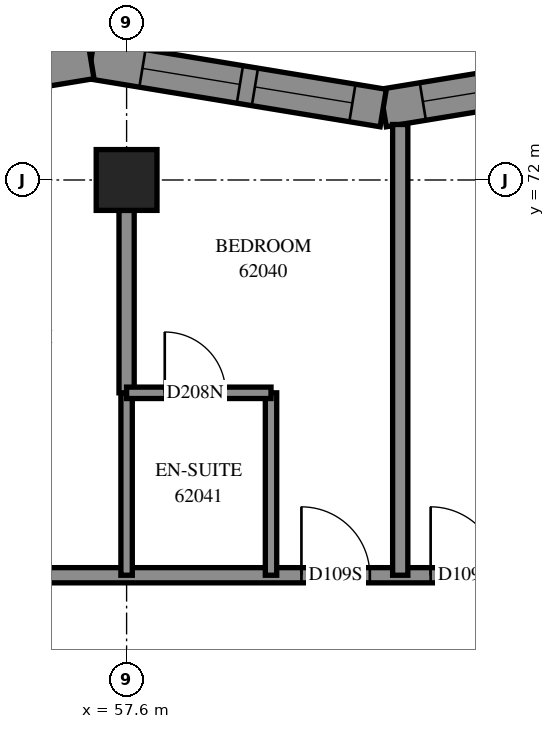
"""IFC4 building model, lengths in metres.
Left out: names, types, materials, properties, quantities, classifications, styles, units other than length and angle.
Written with IfcOpenShell. Run it as: python <this file> out.ifc"""

import sys

from ifc_helpers import new_model, si_unit, direction, frame, frame_2d, origin, origin_2d, place, context, subcontext, project, spatial, polyline, rectangle, outline, extrude, element, fill, save


model = new_model("IFC4")
c1 = context("Model", 3, precision=1e-05, world=origin(), true_north=direction((0.0, 1.0)))
c2 = subcontext(c1, "Body", "Model", "MODEL_VIEW")
j1 = project(units=[si_unit("LENGTHUNIT", "METRE"), si_unit("PLANEANGLEUNIT", "RADIAN")], contexts=[c1])
p1 = place(None, origin())
s1 = spatial("IfcSite", under=j1, at=p1, CompositionType="ELEMENT")
p2 = place(p1, origin())
s2 = spatial("IfcBuilding", under=s1, at=p2, CompositionType="ELEMENT")
p3 = place(p2, frame((0.0, 0.0, 227.0)))
s3 = spatial("IfcBuildingStorey", under=s2, at=p3, CompositionType="ELEMENT", Elevation=227.0)
p4 = place(p3, frame((57.6, 72.0, 0.0), z_axis=(0.0, 0.0, 1.0), x_axis=(1.0, 0.0, 0.0)))
e1 = element("IfcColumn", 1, at=p4, inside=s3, PredefinedType="COLUMN", context=c2, shape_type="SweptSolid", body=[
    extrude(rectangle(XDim=0.8, YDim=0.8, at=origin_2d()), origin(), (0.0, 0.0, 1.0), 3.1),
])
p5 = place(p3, frame((64.822, 73.58, 0.0), z_axis=(0.0, 0.0, 1.0), x_axis=(-0.9867213513, -0.1624222118, 0.0)))
e2 = element("IfcWall", 2, at=p5, inside=s3, PredefinedType="SOLIDWALL", context=c2, shape_type="SweptSolid", body=[
    extrude(outline(polyline([(-0.041, -0.25), (3.856, -0.25), (3.938, 0.25), (0.041, 0.25), (-0.041, -0.25)])), origin(), (0.0, 0.0, 1.0), 3.1),
])
p6 = place(p5, frame((0.569, 0.0, 0.45)))
e3 = element("IfcOpeningElement", 3, at=p6, cuts=e2, PredefinedType="OPENING", context=c2, shape_type="SweptSolid", body=[
    extrude(rectangle(XDim=1.3, YDim=2.5, at=frame_2d((0.65, 1.25))), frame((0.0, 0.26, 0.0), z_axis=(0.0, -1.0, 0.0), x_axis=(1.0, 0.0, 0.0)), (0.0, 0.0, 1.0), 0.52),
])
p7 = place(p5, frame((2.069, 0.0, 0.45)))
e4 = element("IfcOpeningElement", 4, at=p7, cuts=e2, PredefinedType="OPENING", context=c2, shape_type="SweptSolid", body=[
    extrude(rectangle(XDim=1.3, YDim=2.5, at=frame_2d((0.65, 1.25))), frame((0.0, 0.26, 0.0), z_axis=(0.0, -1.0, 0.0), x_axis=(1.0, 0.0, 0.0)), (0.0, 0.0, 1.0), 0.52),
])
p8 = place(p3, frame((60.976, 72.947, 0.0), z_axis=(0.0, 0.0, 1.0), x_axis=(-0.9867206744, 0.1624263241, 0.0)))
e5 = element("IfcWall", 5, at=p8, inside=s3, PredefinedType="SOLIDWALL", context=c2, shape_type="SweptSolid", body=[
    extrude(outline(polyline([(0.041, -0.25), (3.938, -0.25), (3.856, 0.25), (-0.041, 0.25), (0.041, -0.25)])), origin(), (0.0, 0.0, 1.0), 3.1),
])
p9 = place(p8, frame((0.411, 0.0, 0.45)))
e6 = element("IfcOpeningElement", 6, at=p9, cuts=e5, PredefinedType="OPENING", context=c2, shape_type="SweptSolid", body=[
    extrude(rectangle(XDim=1.3, YDim=2.5, at=frame_2d((0.65, 1.25))), frame((0.0, 0.26, 0.0), z_axis=(0.0, -1.0, 0.0), x_axis=(1.0, 0.0, 0.0)), (0.0, 0.0, 1.0), 0.52),
])
p10 = place(p8, frame((1.911, 0.0, 0.45)))
e7 = element("IfcOpeningElement", 7, at=p10, cuts=e5, PredefinedType="OPENING", context=c2, shape_type="SweptSolid", body=[
    extrude(rectangle(XDim=1.3, YDim=2.5, at=frame_2d((0.65, 1.25))), frame((0.0, 0.26, 0.0), z_axis=(0.0, -1.0, 0.0), x_axis=(1.0, 0.0, 0.0)), (0.0, 0.0, 1.0), 0.52),
])
p11 = place(p3, frame((57.131, 73.58, 0.0), z_axis=(0.0, 0.0, 1.0), x_axis=(-0.9867213513, -0.1624222118, 0.0)))
e8 = element("IfcWall", 8, at=p11, inside=s3, PredefinedType="SOLIDWALL", context=c2, shape_type="SweptSolid", body=[
    extrude(outline(polyline([(-0.041, -0.25), (3.856, -0.25), (3.938, 0.25), (0.041, 0.25), (-0.041, -0.25)])), origin(), (0.0, 0.0, 1.0), 3.1),
])
p12 = place(p11, frame((1.107, 0.0, 0.45)))
e9 = element("IfcOpeningElement", 9, at=p12, cuts=e8, PredefinedType="OPENING", context=c2, shape_type="SweptSolid", body=[
    extrude(rectangle(XDim=1.2, YDim=2.5, at=frame_2d((0.6, 1.25))), frame((0.0, 0.26, 0.0), z_axis=(0.0, -1.0, 0.0), x_axis=(1.0, 0.0, 0.0)), (0.0, 0.0, 1.0), 0.52),
])
p13 = place(p3, frame((55.6, 66.8, 0.0), z_axis=(0.0, 0.0, 1.0), x_axis=(1.0, 0.0, 0.0)))
e10 = element("IfcWall", 10, at=p13, inside=s3, PredefinedType="PARTITIONING", context=c2, shape_type="SweptSolid", body=[
    extrude(rectangle(XDim=18.4, YDim=0.2, at=frame_2d((9.2, 0.0))), origin(), (0.0, 0.0, 1.0), 3.1),
])
p14 = place(p13, frame((4.3, 0.0, 0.0)))
e11 = element("IfcOpeningElement", 11, at=p14, cuts=e10, PredefinedType="OPENING", context=c2, shape_type="SweptSolid", body=[
    extrude(rectangle(XDim=0.9, YDim=2.1, at=frame_2d((0.45, 1.05))), frame((0.0, 0.11, 0.0), z_axis=(0.0, -1.0, 0.0), x_axis=(1.0, 0.0, 0.0)), (0.0, 0.0, 1.0), 0.22),
])
p15 = place(p13, frame((6.0, 0.0, 0.0)))
e12 = element("IfcOpeningElement", 12, at=p15, cuts=e10, PredefinedType="OPENING", context=c2, shape_type="SweptSolid", body=[
    extrude(rectangle(XDim=0.9, YDim=2.1, at=frame_2d((0.45, 1.05))), frame((0.0, 0.11, 0.0), z_axis=(0.0, -1.0, 0.0), x_axis=(1.0, 0.0, 0.0)), (0.0, 0.0, 1.0), 0.22),
])
p16 = place(p13, frame((13.367, 0.0, 0.0)))
e13 = element("IfcOpeningElement", 13, at=p16, cuts=e10, PredefinedType="OPENING", context=c2, shape_type="SweptSolid", body=[
    extrude(rectangle(XDim=1.0, YDim=2.1, at=frame_2d((0.5, 1.05))), frame((0.0, 0.11, 0.0), z_axis=(0.0, -1.0, 0.0), x_axis=(1.0, 0.0, 0.0)), (0.0, 0.0, 1.0), 0.22),
])
p17 = place(p3, frame((61.2, 66.8, 0.0), z_axis=(0.0, 0.0, 1.0), x_axis=(0.0, 1.0, 0.0)))
e14 = element("IfcWall", 14, at=p17, inside=s3, PredefinedType="PARTITIONING", context=c2, shape_type="SweptSolid", body=[
    extrude(rectangle(XDim=5.93, YDim=0.2, at=frame_2d((2.965, 0.0))), origin(), (0.0, 0.0, 1.0), 3.1),
])
for number, where, z_axis, x_axis in (
    (15, (57.6, 66.8, 0.0), (0.0, 0.0, 1.0), (0.0, 1.0, 0.0)),
    (16, (59.5, 66.8, 0.0), (0.0, 0.0, 1.0), (0.0, 1.0, 0.0)),
):
    element("IfcWall", number, at=place(p3, frame(where, z_axis=z_axis, x_axis=x_axis)), inside=s3, PredefinedType="PARTITIONING", context=c2, shape_type="SweptSolid", body=[
        extrude(rectangle(XDim=2.4, YDim=0.15, at=frame_2d((1.2, 0.0))), origin(), (0.0, 0.0, 1.0), 3.1),
    ])
p18 = place(p3, frame((57.6, 69.2, 0.0), z_axis=(0.0, 0.0, 1.0), x_axis=(0.0, 1.0, 0.0)))
e17 = element("IfcWall", 17, at=p18, inside=s3, PredefinedType="PARTITIONING", context=c2, shape_type="SweptSolid", body=[
    extrude(rectangle(XDim=2.4, YDim=0.2, at=frame_2d((1.2, 0.0))), origin(), (0.0, 0.0, 1.0), 3.1),
])
p19 = place(p3, frame((57.6, 69.2, 0.0), z_axis=(0.0, 0.0, 1.0), x_axis=(1.0, 0.0, 0.0)))
e18 = element("IfcWall", 18, at=p19, inside=s3, PredefinedType="PARTITIONING", context=c2, shape_type="SweptSolid", body=[
    extrude(rectangle(XDim=1.9, YDim=0.15, at=frame_2d((0.95, 0.0))), origin(), (0.0, 0.0, 1.0), 3.1),
])
p20 = place(p19, frame((0.502, 0.0, 0.0)))
e19 = element("IfcOpeningElement", 19, at=p20, cuts=e18, PredefinedType="OPENING", context=c2, shape_type="SweptSolid", body=[
    extrude(rectangle(XDim=0.8, YDim=2.1, at=frame_2d((0.4, 1.05))), frame((0.0, 0.085, 0.0), z_axis=(0.0, -1.0, 0.0), x_axis=(1.0, 0.0, 0.0)), (0.0, 0.0, 1.0), 0.17),
])
p21 = place(p7, origin())
e20 = element("IfcWindow", 20, at=p21, inside=s3, PartitioningType="SINGLE_PANEL", PredefinedType="WINDOW", context=c2, shape_type="SweptSolid", body=[
    extrude(rectangle(XDim=1.3, YDim=2.5, at=frame_2d((0.65, 1.25))), frame((0.0, 0.18, 0.0), z_axis=(0.0, -1.0, 0.0), x_axis=(1.0, 0.0, 0.0)), (0.0, 0.0, 1.0), 0.06),
])
fill(e4, e20)
p22 = place(p9, origin())
e21 = element("IfcWindow", 21, at=p22, inside=s3, PartitioningType="SINGLE_PANEL", PredefinedType="WINDOW", context=c2, shape_type="SweptSolid", body=[
    extrude(rectangle(XDim=1.3, YDim=2.5, at=frame_2d((0.65, 1.25))), frame((0.0, 0.18, 0.0), z_axis=(0.0, -1.0, 0.0), x_axis=(1.0, 0.0, 0.0)), (0.0, 0.0, 1.0), 0.06),
])
fill(e6, e21)
p23 = place(p10, origin())
e22 = element("IfcWindow", 22, at=p23, inside=s3, PartitioningType="SINGLE_PANEL", PredefinedType="WINDOW", context=c2, shape_type="SweptSolid", body=[
    extrude(rectangle(XDim=1.3, YDim=2.5, at=frame_2d((0.65, 1.25))), frame((0.0, 0.18, 0.0), z_axis=(0.0, -1.0, 0.0), x_axis=(1.0, 0.0, 0.0)), (0.0, 0.0, 1.0), 0.06),
])
fill(e7, e22)
p24 = place(p14, origin())
e23 = element("IfcDoor", 23, at=p24, inside=s3, OperationType="SINGLE_SWING_RIGHT", PredefinedType="DOOR", context=c2, shape_type="SweptSolid", body=[
    extrude(rectangle(XDim=0.9, YDim=2.1, at=frame_2d((0.45, 1.05))), frame((0.0, 0.025, 0.0), z_axis=(0.0, -1.0, 0.0), x_axis=(1.0, 0.0, 0.0)), (0.0, 0.0, 1.0), 0.05),
])
fill(e11, e23)
p25 = place(p20, origin())
e24 = element("IfcDoor", 24, at=p25, inside=s3, OperationType="SINGLE_SWING_RIGHT", PredefinedType="DOOR", context=c2, shape_type="SweptSolid", body=[
    extrude(rectangle(XDim=0.8, YDim=2.1, at=frame_2d((0.4, 1.05))), frame((0.0, 0.025, 0.0), z_axis=(0.0, -1.0, 0.0), x_axis=(1.0, 0.0, 0.0)), (0.0, 0.0, 1.0), 0.05),
])
fill(e19, e24)
p26 = place(p15, origin())
e25 = element("IfcDoor", 25, at=p26, inside=s3, OperationType="SINGLE_SWING_LEFT", PredefinedType="DOOR", context=c2, shape_type="SweptSolid", body=[
    extrude(rectangle(XDim=0.9, YDim=2.1, at=frame_2d((0.45, 1.05))), frame((0.0, 0.025, 0.0), z_axis=(0.0, -1.0, 0.0), x_axis=(1.0, 0.0, 0.0)), (0.0, 0.0, 1.0), 0.05),
])
fill(e12, e25)
save(model, sys.argv[1])
